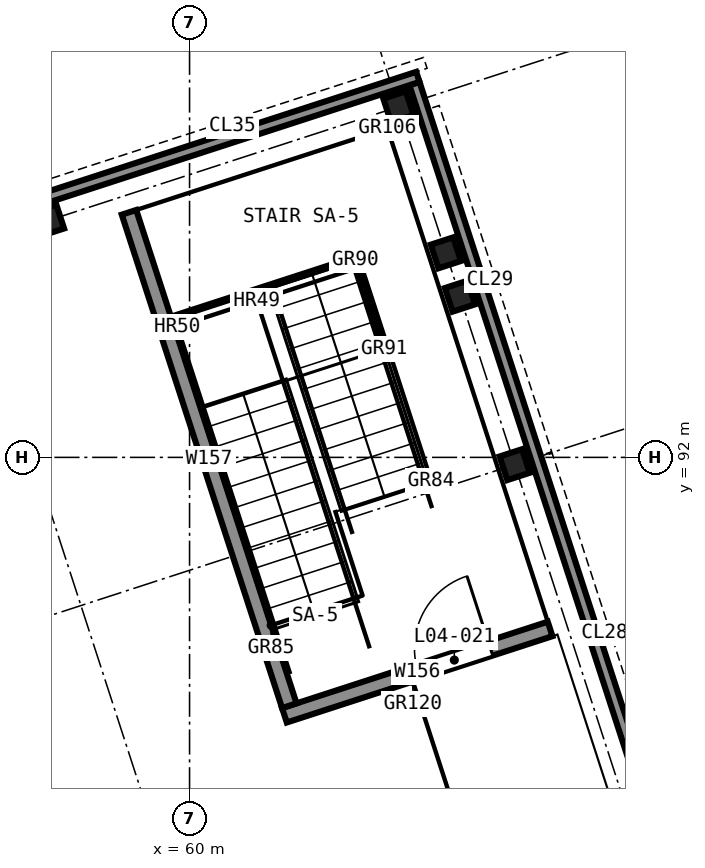
"""IFC4 building model, lengths in metres.
Left out: names, types, materials, properties, quantities, classifications, styles, units other than length and angle.
Written with IfcOpenShell. Run it as: python <this file> out.ifc"""

import sys

from ifc_helpers import new_model, si_unit, direction, frame, frame_2d, origin, origin_2d, place, context, subcontext, project, spatial, rectangle, i_section, extrude, element, fill, save


model = new_model("IFC4")
c1 = context("Model", 3, precision=1e-05, world=origin(), true_north=direction((0.0, 1.0)))
c2 = subcontext(c1, "Body", "Model", "MODEL_VIEW")
j1 = project(units=[si_unit("LENGTHUNIT", "METRE"), si_unit("PLANEANGLEUNIT", "RADIAN")], contexts=[c1])
p1 = place(None, origin())
s1 = spatial("IfcSite", under=j1, at=p1, CompositionType="ELEMENT")
p2 = place(p1, origin())
s2 = spatial("IfcBuilding", under=s1, at=p2, CompositionType="ELEMENT")
p3 = place(p2, frame((0.0, 0.0, 17.5)))
s3 = spatial("IfcBuildingStorey", under=s2, at=p3, CompositionType="ELEMENT", Elevation=17.5)
for number, where, z_axis, x_axis in (
    (1, (63.557, 94.12, 0.0), (0.0, 0.0, 1.0), (0.951, 0.309, 0.0)),
    (2, (63.372, 94.691, 0.0), (0.0, 0.0, 1.0), (0.951, 0.309, 0.0)),
):
    element("IfcColumn", number, at=place(p3, frame(where, z_axis=z_axis, x_axis=x_axis)), inside=s3, PredefinedType="COLUMN", context=c2, shape_type="SweptSolid", body=[
        extrude(i_section(OverallWidth=0.311, OverallDepth=0.327, WebThickness=0.016, FlangeThickness=0.025, FilletRadius=0.017, at=origin_2d()), origin(), (0.0, 0.0, 1.0), 4.0),
    ])
p4 = place(p3, frame((64.743, 89.743, 0.0), z_axis=(0.0, 0.0, 1.0), x_axis=(-0.95104773735, -0.309044011885, 0.0)))
e3 = element("IfcWall", 3, at=p4, inside=s3, PredefinedType="SOLIDWALL", context=c2, shape_type="SweptSolid", body=[
    extrude(rectangle(XDim=3.675, YDim=0.2, at=frame_2d((1.837, 0.0))), origin(), (0.0, 0.0, 1.0), 4.0),
])
p5 = place(p4, frame((0.825, 0.0, 0.0)))
e4 = element("IfcOpeningElement", 4, at=p5, cuts=e3, PredefinedType="OPENING", context=c2, shape_type="SweptSolid", body=[
    extrude(rectangle(XDim=1.0, YDim=2.1, at=frame_2d((0.5, 1.05))), frame((0.0, 0.11, 0.0), z_axis=(0.0, -1.0, 0.0), x_axis=(1.0, 0.0, 0.0)), (0.0, 0.0, 1.0), 0.22),
])
p6 = place(p3, frame((61.312, 88.733, 0.0), z_axis=(0.0, 0.0, 1.0), x_axis=(-0.309028643499, 0.951052731186, 0.0)))
e5 = element("IfcWall", 5, at=p6, inside=s3, PredefinedType="SOLIDWALL", context=c2, shape_type="SweptSolid", body=[
    extrude(rectangle(XDim=6.825, YDim=0.2, at=frame_2d((3.413, 0.0))), origin(), (0.0, 0.0, 1.0), 4.0),
])
for number, where, z_axis, x_axis in (
    (6, (64.277, 91.905, 0.0), (0.0, 0.0, 1.0), (0.951, 0.309, 0.0)),
    (7, (58.151, 95.119, 0.0), (0.0, 0.0, 1.0), (0.951, 0.309, 0.0)),
    (8, (62.748, 96.612, 0.0), (0.0, 0.0, 1.0), (0.951, 0.309, 0.0)),
):
    element("IfcColumn", number, at=place(p3, frame(where, z_axis=z_axis, x_axis=x_axis)), inside=s3, PredefinedType="COLUMN", context=c2, shape_type="SweptSolid", body=[
        extrude(i_section(OverallWidth=0.311, OverallDepth=0.327, WebThickness=0.016, FlangeThickness=0.025, FilletRadius=0.017, at=origin_2d()), origin(), (0.0, 0.0, 1.0), 4.0),
    ])
p7 = place(p3, frame((69.147, 77.873, 0.0), z_axis=(0.0, 0.0, 1.0), x_axis=(-0.309027903543, 0.951052971622, 0.0)))
e9 = element("IfcWall", 9, at=p7, inside=s3, PredefinedType="SOLIDWALL", context=c2, shape_type="SweptSolid", body=[
    extrude(rectangle(XDim=20.025, YDim=0.14, at=frame_2d((10.012, 0.0))), origin(), (0.0, 0.0, 1.0), 4.0),
])
p8 = place(p3, frame((35.219, 87.978, 0.0), z_axis=(0.0, 0.0, 1.0), x_axis=(0.951055192004, 0.309021070093, 0.0)))
e10 = element("IfcWall", 10, at=p8, inside=s3, PredefinedType="SOLIDWALL", context=c2, shape_type="SweptSolid", body=[
    extrude(rectangle(XDim=29.215, YDim=0.14, at=frame_2d((14.607, 0.0))), origin(), (0.0, 0.0, 1.0), 4.0),
])
p9 = place(p5, frame((1.0, 0.0, 0.0), z_axis=(0.0, 0.0, 1.0), x_axis=(-1.0, 0.0, 0.0)))
e11 = element("IfcDoor", 11, at=p9, inside=s3, OperationType="SINGLE_SWING_LEFT", PredefinedType="DOOR", context=c2, shape_type="SweptSolid", body=[
    extrude(rectangle(XDim=1.0, YDim=2.1, at=frame_2d((0.5, 1.05))), frame((0.0, 0.025, 0.0), z_axis=(0.0, -1.0, 0.0), x_axis=(1.0, 0.0, 0.0)), (0.0, 0.0, 1.0), 0.05),
])
fill(e4, e11)
save(model, sys.argv[1])
